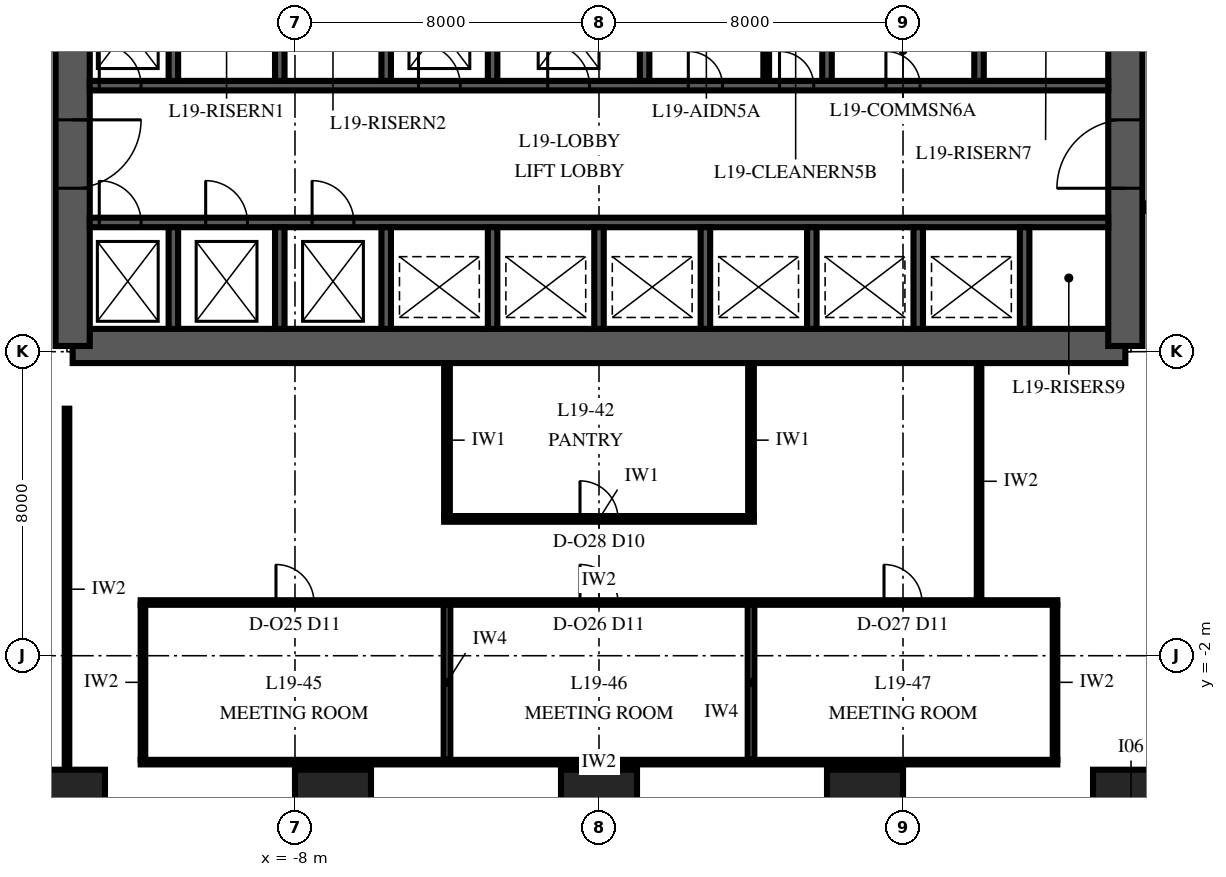
"""IFC4 building model, lengths in metres.
Left out: names, types, materials, properties, quantities, classifications, styles, units other than length and angle.
Written with IfcOpenShell. Run it as: python <this file> out.ifc"""

import sys

from ifc_helpers import new_model, si_unit, direction, frame, frame_2d, origin, origin_2d, place, context, subcontext, project, spatial, polyline, rectangle, outline, extrude, element, fill, save


model = new_model("IFC4")
c1 = context("Model", 3, precision=1e-05, world=origin(), true_north=direction((0.0, 1.0)))
c2 = subcontext(c1, "Body", "Model", "MODEL_VIEW")
j1 = project(units=[si_unit("LENGTHUNIT", "METRE"), si_unit("PLANEANGLEUNIT", "RADIAN")], contexts=[c1])
p1 = place(None, origin())
s1 = spatial("IfcSite", under=j1, at=p1, CompositionType="ELEMENT")
p2 = place(p1, origin())
s2 = spatial("IfcBuilding", under=s1, at=p2, CompositionType="ELEMENT")
p3 = place(p2, frame((0.0, 0.0, 88.0)))
s3 = spatial("IfcBuildingStorey", under=s2, at=p3, CompositionType="ELEMENT", Elevation=88.0)
for number, where, z_axis, x_axis in (
    (1, (-14.0, -6.0, 0.0), (0.0, 0.0, 1.0), (1.0, 0.0, 0.0)),
    (2, (-7.0, -6.0, 0.0), (0.0, 0.0, 1.0), (1.0, 0.0, 0.0)),
    (3, (0.0, -6.0, 0.0), (0.0, 0.0, 1.0), (1.0, 0.0, 0.0)),
    (4, (7.0, -6.0, 0.0), (0.0, 0.0, 1.0), (1.0, 0.0, 0.0)),
    (5, (14.0, -6.0, 0.0), (0.0, 0.0, 1.0), (1.0, 0.0, 0.0)),
):
    element("IfcColumn", number, at=place(p3, frame(where, z_axis=z_axis, x_axis=x_axis)), inside=s3, PredefinedType="COLUMN", context=c2, shape_type="SweptSolid", body=[
        extrude(rectangle(XDim=2.0, YDim=2.0, at=origin_2d()), origin(), (0.0, 0.0, 1.0), 4.0),
    ])
p4 = place(p3, frame((-13.85, 6.15, 0.0), z_axis=(0.0, 0.0, 1.0), x_axis=(1.0, 0.0, 0.0)))
e6 = element("IfcWall", 6, at=p4, inside=s3, PredefinedType="SHEAR", context=c2, shape_type="SweptSolid", body=[
    extrude(rectangle(XDim=27.7, YDim=0.9, at=frame_2d((13.85, 0.0))), origin(), (0.0, 0.0, 1.0), 4.0),
])
p5 = place(p3, frame((13.85, 6.15, 0.0), z_axis=(0.0, 0.0, 1.0), x_axis=(0.0, 1.0, 0.0)))
e7 = element("IfcWall", 7, at=p5, inside=s3, PredefinedType="SHEAR", context=c2, shape_type="SweptSolid", body=[
    extrude(outline(polyline([(0.0, -0.45), (17.7, -0.45), (17.7, 0.0), (17.25, 0.0), (17.25, 0.45), (0.45, 0.45), (0.45, 0.0), (0.0, 0.0), (0.0, -0.45)])), origin(), (0.0, 0.0, 1.0), 4.0),
])
p6 = place(p5, frame((4.15, 0.0, 0.0)))
e8 = element("IfcOpeningElement", 8, at=p6, cuts=e7, PredefinedType="OPENING", context=c2, shape_type="SweptSolid", body=[
    extrude(rectangle(XDim=1.8, YDim=2.4, at=frame_2d((0.9, 1.2))), frame((0.0, 0.465, 0.0), z_axis=(0.0, -1.0, 0.0), x_axis=(1.0, 0.0, 0.0)), (0.0, 0.0, 1.0), 0.93),
])
p7 = place(p3, frame((-13.85, 23.85, 0.0), z_axis=(0.0, 0.0, 1.0), x_axis=(0.0, -1.0, 0.0)))
e9 = element("IfcWall", 9, at=p7, inside=s3, PredefinedType="SHEAR", context=c2, shape_type="SweptSolid", body=[
    extrude(outline(polyline([(0.0, -0.45), (17.7, -0.45), (17.7, 0.0), (17.25, 0.0), (17.25, 0.45), (0.45, 0.45), (0.45, 0.0), (0.0, 0.0), (0.0, -0.45)])), origin(), (0.0, 0.0, 1.0), 4.0),
])
p8 = place(p7, frame((11.75, 0.0, 0.0)))
e10 = element("IfcOpeningElement", 10, at=p8, cuts=e9, PredefinedType="OPENING", context=c2, shape_type="SweptSolid", body=[
    extrude(rectangle(XDim=1.8, YDim=2.4, at=frame_2d((0.9, 1.2))), frame((0.0, 0.465, 0.0), z_axis=(0.0, -1.0, 0.0), x_axis=(1.0, 0.0, 0.0)), (0.0, 0.0, 1.0), 0.93),
])
p9 = place(p3, frame((-13.4, 9.4, 0.0), z_axis=(0.0, 0.0, 1.0), x_axis=(1.0, 0.0, 0.0)))
e11 = element("IfcWall", 11, at=p9, inside=s3, PredefinedType="SHEAR", context=c2, shape_type="SweptSolid", body=[
    extrude(rectangle(XDim=26.8, YDim=0.25, at=frame_2d((13.4, 0.0))), origin(), (0.0, 0.0, 1.0), 4.0),
])
p10 = place(p9, frame((0.25, 0.0, 0.0)))
e12 = element("IfcOpeningElement", 12, at=p10, cuts=e11, PredefinedType="OPENING", context=c2, shape_type="SweptSolid", body=[
    extrude(rectangle(XDim=1.1, YDim=2.1, at=frame_2d((0.55, 1.05))), frame((0.0, 0.14, 0.0), z_axis=(0.0, -1.0, 0.0), x_axis=(1.0, 0.0, 0.0)), (0.0, 0.0, 1.0), 0.28),
])
p11 = place(p9, frame((3.05, 0.0, 0.0)))
e13 = element("IfcOpeningElement", 13, at=p11, cuts=e11, PredefinedType="OPENING", context=c2, shape_type="SweptSolid", body=[
    extrude(rectangle(XDim=1.1, YDim=2.1, at=frame_2d((0.55, 1.05))), frame((0.0, 0.14, 0.0), z_axis=(0.0, -1.0, 0.0), x_axis=(1.0, 0.0, 0.0)), (0.0, 0.0, 1.0), 0.28),
])
p12 = place(p9, frame((5.85, 0.0, 0.0)))
e14 = element("IfcOpeningElement", 14, at=p12, cuts=e11, PredefinedType="OPENING", context=c2, shape_type="SweptSolid", body=[
    extrude(rectangle(XDim=1.1, YDim=2.1, at=frame_2d((0.55, 1.05))), frame((0.0, 0.14, 0.0), z_axis=(0.0, -1.0, 0.0), x_axis=(1.0, 0.0, 0.0)), (0.0, 0.0, 1.0), 0.28),
])
p13 = place(p3, frame((-13.4, 13.0, 0.0), z_axis=(0.0, 0.0, 1.0), x_axis=(1.0, 0.0, 0.0)))
e15 = element("IfcWall", 15, at=p13, inside=s3, PredefinedType="SHEAR", context=c2, shape_type="SweptSolid", body=[
    extrude(rectangle(XDim=26.8, YDim=0.25, at=frame_2d((13.4, 0.0))), origin(), (0.0, 0.0, 1.0), 4.0),
])
p14 = place(p13, frame((0.25, 0.0, 0.0)))
e16 = element("IfcOpeningElement", 16, at=p14, cuts=e15, PredefinedType="OPENING", context=c2, shape_type="SweptSolid", body=[
    extrude(rectangle(XDim=1.1, YDim=2.1, at=frame_2d((0.55, 1.05))), frame((0.0, 0.14, 0.0), z_axis=(0.0, -1.0, 0.0), x_axis=(1.0, 0.0, 0.0)), (0.0, 0.0, 1.0), 0.28),
])
p15 = place(p13, frame((8.65, 0.0, 0.0)))
e17 = element("IfcOpeningElement", 17, at=p15, cuts=e15, PredefinedType="OPENING", context=c2, shape_type="SweptSolid", body=[
    extrude(rectangle(XDim=1.1, YDim=2.1, at=frame_2d((0.55, 1.05))), frame((0.0, 0.14, 0.0), z_axis=(0.0, -1.0, 0.0), x_axis=(1.0, 0.0, 0.0)), (0.0, 0.0, 1.0), 0.28),
])
p16 = place(p13, frame((12.05, 0.0, 0.0)))
e18 = element("IfcOpeningElement", 18, at=p16, cuts=e15, PredefinedType="OPENING", context=c2, shape_type="SweptSolid", body=[
    extrude(rectangle(XDim=1.1, YDim=2.1, at=frame_2d((0.55, 1.05))), frame((0.0, 0.14, 0.0), z_axis=(0.0, -1.0, 0.0), x_axis=(1.0, 0.0, 0.0)), (0.0, 0.0, 1.0), 0.28),
])
p17 = place(p13, frame((15.75, 0.0, 0.0)))
e19 = element("IfcOpeningElement", 19, at=p17, cuts=e15, PredefinedType="OPENING", context=c2, shape_type="SweptSolid", body=[
    extrude(rectangle(XDim=0.9, YDim=2.1, at=frame_2d((0.45, 1.05))), frame((0.0, 0.14, 0.0), z_axis=(0.0, -1.0, 0.0), x_axis=(1.0, 0.0, 0.0)), (0.0, 0.0, 1.0), 0.28),
])
p18 = place(p13, frame((18.15, 0.0, 0.0)))
e20 = element("IfcOpeningElement", 20, at=p18, cuts=e15, PredefinedType="OPENING", context=c2, shape_type="SweptSolid", body=[
    extrude(rectangle(XDim=0.9, YDim=2.1, at=frame_2d((0.45, 1.05))), frame((0.0, 0.14, 0.0), z_axis=(0.0, -1.0, 0.0), x_axis=(1.0, 0.0, 0.0)), (0.0, 0.0, 1.0), 0.28),
])
p19 = place(p13, frame((20.95, 0.0, 0.0)))
e21 = element("IfcOpeningElement", 21, at=p19, cuts=e15, PredefinedType="OPENING", context=c2, shape_type="SweptSolid", body=[
    extrude(rectangle(XDim=0.9, YDim=2.1, at=frame_2d((0.45, 1.05))), frame((0.0, 0.14, 0.0), z_axis=(0.0, -1.0, 0.0), x_axis=(1.0, 0.0, 0.0)), (0.0, 0.0, 1.0), 0.28),
])
for number, where, z_axis, x_axis in (
    (22, (-11.2, 6.6, 0.0), (0.0, 0.0, 1.0), (0.0, 1.0, 0.0)),
    (23, (-8.4, 6.6, 0.0), (0.0, 0.0, 1.0), (0.0, 1.0, 0.0)),
    (24, (-5.6, 6.6, 0.0), (0.0, 0.0, 1.0), (0.0, 1.0, 0.0)),
    (25, (-2.8, 6.6, 0.0), (0.0, 0.0, 1.0), (0.0, 1.0, 0.0)),
    (26, (0.0, 6.6, 0.0), (0.0, 0.0, 1.0), (0.0, 1.0, 0.0)),
    (27, (2.8, 6.6, 0.0), (0.0, 0.0, 1.0), (0.0, 1.0, 0.0)),
    (28, (5.6, 6.6, 0.0), (0.0, 0.0, 1.0), (0.0, 1.0, 0.0)),
    (29, (8.4, 6.6, 0.0), (0.0, 0.0, 1.0), (0.0, 1.0, 0.0)),
    (30, (11.2, 6.6, 0.0), (0.0, 0.0, 1.0), (0.0, 1.0, 0.0)),
):
    element("IfcWall", number, at=place(p3, frame(where, z_axis=z_axis, x_axis=x_axis)), inside=s3, PredefinedType="SHEAR", context=c2, shape_type="SweptSolid", body=[
        extrude(rectangle(XDim=2.675, YDim=0.25, at=frame_2d((1.337, 0.0))), origin(), (0.0, 0.0, 1.0), 4.0),
    ])
for number, where, z_axis, x_axis in (
    (31, (-11.2, 13.125, 0.0), (0.0, 0.0, 1.0), (0.0, 1.0, 0.0)),
    (32, (-8.4, 13.125, 0.0), (0.0, 0.0, 1.0), (0.0, 1.0, 0.0)),
    (33, (-5.6, 13.125, 0.0), (0.0, 0.0, 1.0), (0.0, 1.0, 0.0)),
    (34, (-2.8, 13.125, 0.0), (0.0, 0.0, 1.0), (0.0, 1.0, 0.0)),
    (35, (1.2, 13.125, 0.0), (0.0, 0.0, 1.0), (0.0, 1.0, 0.0)),
    (36, (6.0, 13.125, 0.0), (0.0, 0.0, 1.0), (0.0, 1.0, 0.0)),
    (37, (10.0, 13.125, 0.0), (0.0, 0.0, 1.0), (0.0, 1.0, 0.0)),
):
    element("IfcWall", number, at=place(p3, frame(where, z_axis=z_axis, x_axis=x_axis)), inside=s3, PredefinedType="SHEAR", context=c2, shape_type="SweptSolid", body=[
        extrude(rectangle(XDim=2.75, YDim=0.25, at=frame_2d((1.375, 0.0))), origin(), (0.0, 0.0, 1.0), 4.0),
    ])
p20 = place(p3, frame((4.4, 13.125, 0.0), z_axis=(0.0, 0.0, 1.0), x_axis=(0.0, 1.0, 0.0)))
e38 = element("IfcWall", 38, at=p20, inside=s3, PredefinedType="PARTITIONING", context=c2, shape_type="SweptSolid", body=[
    extrude(rectangle(XDim=2.75, YDim=0.15, at=frame_2d((1.375, 0.0))), origin(), (0.0, 0.0, 1.0), 3.85),
])
p21 = place(p3, frame((-12.06, -4.8, 0.0), z_axis=(0.0, 0.0, 1.0), x_axis=(1.0, 0.0, 0.0)))
e39 = element("IfcWall", 39, at=p21, inside=s3, PredefinedType="PARTITIONING", context=c2, shape_type="SweptSolid", body=[
    extrude(rectangle(XDim=24.12, YDim=0.12, at=frame_2d((12.06, 0.0))), origin(), (0.0, 0.0, 1.0), 3.13),
])
p22 = place(p3, frame((-12.06, -0.6, 0.0), z_axis=(0.0, 0.0, 1.0), x_axis=(1.0, 0.0, 0.0)))
e40 = element("IfcWall", 40, at=p22, inside=s3, PredefinedType="PARTITIONING", context=c2, shape_type="SweptSolid", body=[
    extrude(rectangle(XDim=24.12, YDim=0.12, at=frame_2d((12.06, 0.0))), origin(), (0.0, 0.0, 1.0), 3.13),
])
p23 = place(p22, frame((3.56, 0.0, 0.0)))
e41 = element("IfcOpeningElement", 41, at=p23, cuts=e40, PredefinedType="OPENING", context=c2, shape_type="SweptSolid", body=[
    extrude(rectangle(XDim=1.0, YDim=2.4, at=frame_2d((0.5, 1.2))), frame((0.0, 0.075, 0.0), z_axis=(0.0, -1.0, 0.0), x_axis=(1.0, 0.0, 0.0)), (0.0, 0.0, 1.0), 0.15),
])
p24 = place(p22, frame((11.56, 0.0, 0.0)))
e42 = element("IfcOpeningElement", 42, at=p24, cuts=e40, PredefinedType="OPENING", context=c2, shape_type="SweptSolid", body=[
    extrude(rectangle(XDim=1.0, YDim=2.4, at=frame_2d((0.5, 1.2))), frame((0.0, 0.075, 0.0), z_axis=(0.0, -1.0, 0.0), x_axis=(1.0, 0.0, 0.0)), (0.0, 0.0, 1.0), 0.15),
])
p25 = place(p22, frame((19.56, 0.0, 0.0)))
e43 = element("IfcOpeningElement", 43, at=p25, cuts=e40, PredefinedType="OPENING", context=c2, shape_type="SweptSolid", body=[
    extrude(rectangle(XDim=1.0, YDim=2.4, at=frame_2d((0.5, 1.2))), frame((0.0, 0.075, 0.0), z_axis=(0.0, -1.0, 0.0), x_axis=(1.0, 0.0, 0.0)), (0.0, 0.0, 1.0), 0.15),
])
p26 = place(p3, frame((-4.075, 1.6, 0.0), z_axis=(0.0, 0.0, 1.0), x_axis=(1.0, 0.0, 0.0)))
e44 = element("IfcWall", 44, at=p26, inside=s3, PredefinedType="PARTITIONING", context=c2, shape_type="SweptSolid", body=[
    extrude(rectangle(XDim=8.15, YDim=0.15, at=frame_2d((4.075, 0.0))), origin(), (0.0, 0.0, 1.0), 3.13),
])
p27 = place(p26, frame((3.575, 0.0, 0.0)))
e45 = element("IfcOpeningElement", 45, at=p27, cuts=e44, PredefinedType="OPENING", context=c2, shape_type="SweptSolid", body=[
    extrude(rectangle(XDim=1.0, YDim=2.3, at=frame_2d((0.5, 1.15))), frame((0.0, 0.09, 0.0), z_axis=(0.0, -1.0, 0.0), x_axis=(1.0, 0.0, 0.0)), (0.0, 0.0, 1.0), 0.18),
])
p28 = place(p3, frame((14.33, 9.8, 0.0), z_axis=(0.0, 0.0, 1.0), x_axis=(1.0, 0.0, 0.0)))
e46 = element("IfcWall", 46, at=p28, inside=s3, PredefinedType="PARTITIONING", context=c2, shape_type="SweptSolid", body=[
    extrude(rectangle(XDim=2.02, YDim=0.2, at=frame_2d((1.01, 0.0))), origin(), (0.0, 0.0, 1.0), 3.75),
])
p29 = place(p3, frame((-12.0, -4.74, 0.0), z_axis=(0.0, 0.0, 1.0), x_axis=(0.0, 1.0, 0.0)))
e47 = element("IfcWall", 47, at=p29, inside=s3, PredefinedType="PARTITIONING", context=c2, shape_type="SweptSolid", body=[
    extrude(rectangle(XDim=4.08, YDim=0.12, at=frame_2d((2.04, 0.0))), origin(), (0.0, 0.0, 1.0), 3.75),
])
p30 = place(p3, frame((-4.0, -4.74, 0.0), z_axis=(0.0, 0.0, 1.0), x_axis=(0.0, 1.0, 0.0)))
e48 = element("IfcWall", 48, at=p30, inside=s3, PredefinedType="PARTITIONING", context=c2, shape_type="SweptSolid", body=[
    extrude(rectangle(XDim=4.08, YDim=0.175, at=frame_2d((2.04, 0.0))), origin(), (0.0, 0.0, 1.0), 3.75),
])
p31 = place(p3, frame((-4.0, 1.675, 0.0), z_axis=(0.0, 0.0, 1.0), x_axis=(0.0, 1.0, 0.0)))
e49 = element("IfcWall", 49, at=p31, inside=s3, PredefinedType="PARTITIONING", context=c2, shape_type="SweptSolid", body=[
    extrude(rectangle(XDim=3.995, YDim=0.15, at=frame_2d((1.998, 0.0))), origin(), (0.0, 0.0, 1.0), 3.75),
])
p32 = place(p3, frame((4.0, -4.74, 0.0), z_axis=(0.0, 0.0, 1.0), x_axis=(0.0, 1.0, 0.0)))
e50 = element("IfcWall", 50, at=p32, inside=s3, PredefinedType="PARTITIONING", context=c2, shape_type="SweptSolid", body=[
    extrude(rectangle(XDim=4.08, YDim=0.175, at=frame_2d((2.04, 0.0))), origin(), (0.0, 0.0, 1.0), 3.75),
])
p33 = place(p3, frame((4.0, 1.675, 0.0), z_axis=(0.0, 0.0, 1.0), x_axis=(0.0, 1.0, 0.0)))
e51 = element("IfcWall", 51, at=p33, inside=s3, PredefinedType="PARTITIONING", context=c2, shape_type="SweptSolid", body=[
    extrude(rectangle(XDim=3.995, YDim=0.15, at=frame_2d((1.998, 0.0))), origin(), (0.0, 0.0, 1.0), 3.75),
])
p34 = place(p3, frame((12.0, -4.74, 0.0), z_axis=(0.0, 0.0, 1.0), x_axis=(0.0, 1.0, 0.0)))
e52 = element("IfcWall", 52, at=p34, inside=s3, PredefinedType="PARTITIONING", context=c2, shape_type="SweptSolid", body=[
    extrude(rectangle(XDim=4.08, YDim=0.12, at=frame_2d((2.04, 0.0))), origin(), (0.0, 0.0, 1.0), 3.75),
])
p35 = place(p3, frame((-13.999, -5.0, 0.0), z_axis=(0.0, 0.0, 1.0), x_axis=(0.0, 1.0, 0.0)))
e53 = element("IfcWall", 53, at=p35, inside=s3, PredefinedType="PARTITIONING", context=c2, shape_type="SweptSolid", body=[
    extrude(rectangle(XDim=9.5, YDim=0.12, at=frame_2d((4.75, 0.0))), origin(), (0.0, 0.0, 1.0), 3.13),
])
p36 = place(p3, frame((10.001, -0.52, 0.0), z_axis=(0.0, 0.0, 1.0), x_axis=(0.0, 1.0, 0.0)))
e54 = element("IfcWall", 54, at=p36, inside=s3, PredefinedType="PARTITIONING", context=c2, shape_type="SweptSolid", body=[
    extrude(rectangle(XDim=6.22, YDim=0.12, at=frame_2d((3.11, 0.0))), origin(), (0.0, 0.0, 1.0), 3.75),
])
p37 = place(p6, origin())
e55 = element("IfcDoor", 55, at=p37, inside=s3, OperationType="DOUBLE_DOOR_SINGLE_SWING", PredefinedType="DOOR", context=c2, shape_type="SweptSolid", body=[
    extrude(rectangle(XDim=1.8, YDim=2.4, at=frame_2d((0.9, 1.2))), frame((0.0, 0.45, 0.0), z_axis=(0.0, -1.0, 0.0), x_axis=(1.0, 0.0, 0.0)), (0.0, 0.0, 1.0), 0.899),
])
fill(e8, e55)
p38 = place(p8, origin())
e56 = element("IfcDoor", 56, at=p38, inside=s3, OperationType="DOUBLE_DOOR_SINGLE_SWING", PredefinedType="DOOR", context=c2, shape_type="SweptSolid", body=[
    extrude(rectangle(XDim=1.8, YDim=2.4, at=frame_2d((0.9, 1.2))), frame((0.0, 0.45, 0.0), z_axis=(0.0, -1.0, 0.0), x_axis=(1.0, 0.0, 0.0)), (0.0, 0.0, 1.0), 0.899),
])
fill(e10, e56)
p39 = place(p10, origin())
e57 = element("IfcDoor", 57, at=p39, inside=s3, OperationType="SLIDING_TO_LEFT", PredefinedType="DOOR", context=c2, shape_type="SweptSolid", body=[
    extrude(rectangle(XDim=1.1, YDim=2.1, at=frame_2d((0.55, 1.05))), frame((0.0, 0.125, 0.0), z_axis=(0.0, -1.0, 0.0), x_axis=(1.0, 0.0, 0.0)), (0.0, 0.0, 1.0), 0.25),
])
fill(e12, e57)
p40 = place(p11, origin())
e58 = element("IfcDoor", 58, at=p40, inside=s3, OperationType="SLIDING_TO_LEFT", PredefinedType="DOOR", context=c2, shape_type="SweptSolid", body=[
    extrude(rectangle(XDim=1.1, YDim=2.1, at=frame_2d((0.55, 1.05))), frame((0.0, 0.125, 0.0), z_axis=(0.0, -1.0, 0.0), x_axis=(1.0, 0.0, 0.0)), (0.0, 0.0, 1.0), 0.25),
])
fill(e13, e58)
p41 = place(p12, origin())
e59 = element("IfcDoor", 59, at=p41, inside=s3, OperationType="SLIDING_TO_LEFT", PredefinedType="DOOR", context=c2, shape_type="SweptSolid", body=[
    extrude(rectangle(XDim=1.1, YDim=2.1, at=frame_2d((0.55, 1.05))), frame((0.0, 0.125, 0.0), z_axis=(0.0, -1.0, 0.0), x_axis=(1.0, 0.0, 0.0)), (0.0, 0.0, 1.0), 0.25),
])
fill(e14, e59)
p42 = place(p14, origin())
e60 = element("IfcDoor", 60, at=p42, inside=s3, OperationType="SLIDING_TO_LEFT", PredefinedType="DOOR", context=c2, shape_type="SweptSolid", body=[
    extrude(rectangle(XDim=1.1, YDim=2.1, at=frame_2d((0.55, 1.05))), frame((0.0, 0.125, 0.0), z_axis=(0.0, -1.0, 0.0), x_axis=(1.0, 0.0, 0.0)), (0.0, 0.0, 1.0), 0.25),
])
fill(e16, e60)
p43 = place(p15, origin())
e61 = element("IfcDoor", 61, at=p43, inside=s3, OperationType="SLIDING_TO_LEFT", PredefinedType="DOOR", context=c2, shape_type="SweptSolid", body=[
    extrude(rectangle(XDim=1.1, YDim=2.1, at=frame_2d((0.55, 1.05))), frame((0.0, 0.125, 0.0), z_axis=(0.0, -1.0, 0.0), x_axis=(1.0, 0.0, 0.0)), (0.0, 0.0, 1.0), 0.25),
])
fill(e17, e61)
p44 = place(p16, origin())
e62 = element("IfcDoor", 62, at=p44, inside=s3, OperationType="SLIDING_TO_LEFT", PredefinedType="DOOR", context=c2, shape_type="SweptSolid", body=[
    extrude(rectangle(XDim=1.1, YDim=2.1, at=frame_2d((0.55, 1.05))), frame((0.0, 0.125, 0.0), z_axis=(0.0, -1.0, 0.0), x_axis=(1.0, 0.0, 0.0)), (0.0, 0.0, 1.0), 0.25),
])
fill(e18, e62)
p45 = place(p17, origin())
e63 = element("IfcDoor", 63, at=p45, inside=s3, OperationType="SINGLE_SWING_LEFT", PredefinedType="DOOR", context=c2, shape_type="SweptSolid", body=[
    extrude(rectangle(XDim=0.9, YDim=2.1, at=frame_2d((0.45, 1.05))), frame((0.0, 0.125, 0.0), z_axis=(0.0, -1.0, 0.0), x_axis=(1.0, 0.0, 0.0)), (0.0, 0.0, 1.0), 0.25),
])
fill(e19, e63)
p46 = place(p18, origin())
e64 = element("IfcDoor", 64, at=p46, inside=s3, OperationType="SINGLE_SWING_LEFT", PredefinedType="DOOR", context=c2, shape_type="SweptSolid", body=[
    extrude(rectangle(XDim=0.9, YDim=2.1, at=frame_2d((0.45, 1.05))), frame((0.0, 0.125, 0.0), z_axis=(0.0, -1.0, 0.0), x_axis=(1.0, 0.0, 0.0)), (0.0, 0.0, 1.0), 0.25),
])
fill(e20, e64)
p47 = place(p19, origin())
e65 = element("IfcDoor", 65, at=p47, inside=s3, OperationType="SINGLE_SWING_LEFT", PredefinedType="DOOR", context=c2, shape_type="SweptSolid", body=[
    extrude(rectangle(XDim=0.9, YDim=2.1, at=frame_2d((0.45, 1.05))), frame((0.0, 0.125, 0.0), z_axis=(0.0, -1.0, 0.0), x_axis=(1.0, 0.0, 0.0)), (0.0, 0.0, 1.0), 0.25),
])
fill(e21, e65)
p48 = place(p23, origin())
e66 = element("IfcDoor", 66, at=p48, inside=s3, OperationType="SINGLE_SWING_RIGHT", PredefinedType="DOOR", context=c2, shape_type="SweptSolid", body=[
    extrude(rectangle(XDim=1.0, YDim=2.4, at=frame_2d((0.5, 1.2))), frame((0.0, 0.06, 0.0), z_axis=(0.0, -1.0, 0.0), x_axis=(1.0, 0.0, 0.0)), (0.0, 0.0, 1.0), 0.12),
])
fill(e41, e66)
p49 = place(p24, origin())
e67 = element("IfcDoor", 67, at=p49, inside=s3, OperationType="SINGLE_SWING_RIGHT", PredefinedType="DOOR", context=c2, shape_type="SweptSolid", body=[
    extrude(rectangle(XDim=1.0, YDim=2.4, at=frame_2d((0.5, 1.2))), frame((0.0, 0.06, 0.0), z_axis=(0.0, -1.0, 0.0), x_axis=(1.0, 0.0, 0.0)), (0.0, 0.0, 1.0), 0.12),
])
fill(e42, e67)
p50 = place(p25, origin())
e68 = element("IfcDoor", 68, at=p50, inside=s3, OperationType="SINGLE_SWING_RIGHT", PredefinedType="DOOR", context=c2, shape_type="SweptSolid", body=[
    extrude(rectangle(XDim=1.0, YDim=2.4, at=frame_2d((0.5, 1.2))), frame((0.0, 0.06, 0.0), z_axis=(0.0, -1.0, 0.0), x_axis=(1.0, 0.0, 0.0)), (0.0, 0.0, 1.0), 0.12),
])
fill(e43, e68)
p51 = place(p27, origin())
e69 = element("IfcDoor", 69, at=p51, inside=s3, OperationType="SINGLE_SWING_LEFT", PredefinedType="DOOR", context=c2, shape_type="SweptSolid", body=[
    extrude(rectangle(XDim=1.0, YDim=2.3, at=frame_2d((0.5, 1.15))), frame((0.0, 0.075, 0.0), z_axis=(0.0, -1.0, 0.0), x_axis=(1.0, 0.0, 0.0)), (0.0, 0.0, 1.0), 0.149),
])
fill(e45, e69)
save(model, sys.argv[1])
